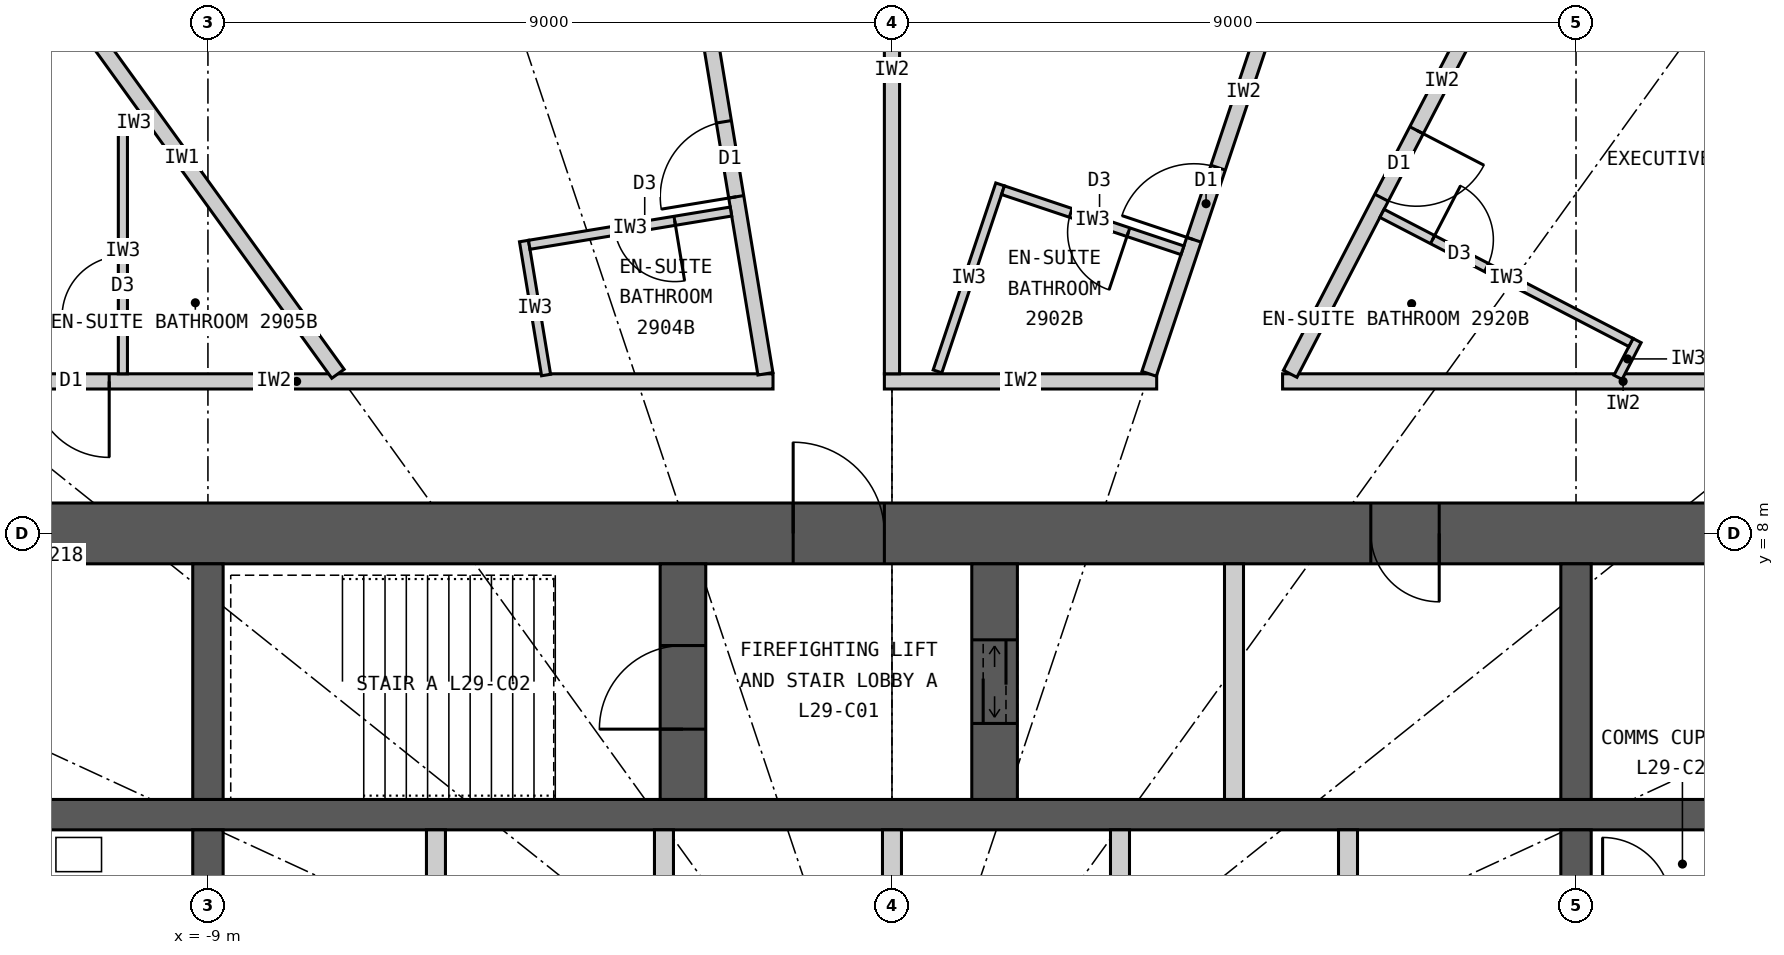
"""IFC4 building model, lengths in metres.
Left out: names, types, materials, properties, quantities, classifications, styles, units other than length and angle.
Written with IfcOpenShell. Run it as: python <this file> out.ifc"""

import sys

from ifc_helpers import new_model, si_unit, direction, frame, frame_2d, origin, place, context, subcontext, project, spatial, rectangle, extrude, element, fill, save


model = new_model("IFC4")
c1 = context("Model", 3, precision=1e-05, world=origin(), true_north=direction((0.0, 1.0)))
c2 = subcontext(c1, "Body", "Model", "MODEL_VIEW")
j1 = project(units=[si_unit("LENGTHUNIT", "METRE"), si_unit("PLANEANGLEUNIT", "RADIAN")], contexts=[c1])
p1 = place(None, origin())
s1 = spatial("IfcSite", under=j1, at=p1, CompositionType="ELEMENT")
p2 = place(p1, origin())
s2 = spatial("IfcBuilding", under=s1, at=p2, CompositionType="ELEMENT")
p3 = place(p2, frame((0.0, 0.0, 115.5)))
s3 = spatial("IfcBuildingStorey", under=s2, at=p3, CompositionType="ELEMENT", Elevation=115.5)
p4 = place(p3, frame((-12.4, 8.0, 0.0), z_axis=(0.0, 0.0, 1.0), x_axis=(1.0, 0.0, 0.0)))
e1 = element("IfcWall", 1, at=p4, inside=s3, PredefinedType="SHEAR", context=c2, shape_type="SweptSolid", body=[
    extrude(rectangle(XDim=24.8, YDim=0.8, at=frame_2d((12.4, 0.0))), origin(), (0.0, 0.0, 1.0), 3.3),
])
p5 = place(p4, frame((11.1, 0.0, 0.0)))
e2 = element("IfcOpeningElement", 2, at=p5, cuts=e1, PredefinedType="OPENING", context=c2, shape_type="SweptSolid", body=[
    extrude(rectangle(XDim=1.2, YDim=2.2, at=frame_2d((0.6, 1.1))), frame((0.0, 0.41, 0.0), z_axis=(0.0, -1.0, 0.0), x_axis=(1.0, 0.0, 0.0)), (0.0, 0.0, 1.0), 0.82),
])
p6 = place(p4, frame((18.7, 0.0, 0.0)))
e3 = element("IfcOpeningElement", 3, at=p6, cuts=e1, PredefinedType="OPENING", context=c2, shape_type="SweptSolid", body=[
    extrude(rectangle(XDim=0.9, YDim=2.2, at=frame_2d((0.45, 1.1))), frame((0.0, 0.41, 0.0), z_axis=(0.0, -1.0, 0.0), x_axis=(1.0, 0.0, 0.0)), (0.0, 0.0, 1.0), 0.82),
])
p7 = place(p3, frame((-11.6, 4.3, 0.0), z_axis=(0.0, 0.0, 1.0), x_axis=(1.0, 0.0, 0.0)))
e4 = element("IfcWall", 4, at=p7, inside=s3, PredefinedType="SHEAR", context=c2, shape_type="SweptSolid", body=[
    extrude(rectangle(XDim=23.2, YDim=0.4, at=frame_2d((11.6, 0.0))), origin(), (0.0, 0.0, 1.0), 3.3),
])
p8 = place(p3, frame((-9.0, 4.5, 0.0), z_axis=(0.0, 0.0, 1.0), x_axis=(0.0, 1.0, 0.0)))
e5 = element("IfcWall", 5, at=p8, inside=s3, PredefinedType="SHEAR", context=c2, shape_type="SweptSolid", body=[
    extrude(rectangle(XDim=3.1, YDim=0.4, at=frame_2d((1.55, 0.0))), origin(), (0.0, 0.0, 1.0), 3.3),
])
p9 = place(p3, frame((-9.0, 1.75, 0.0), z_axis=(0.0, 0.0, 1.0), x_axis=(0.0, 1.0, 0.0)))
e6 = element("IfcWall", 6, at=p9, inside=s3, PredefinedType="SHEAR", context=c2, shape_type="SweptSolid", body=[
    extrude(rectangle(XDim=2.35, YDim=0.4, at=frame_2d((1.175, 0.0))), origin(), (0.0, 0.0, 1.0), 3.3),
])
p10 = place(p3, frame((9.0, 4.5, 0.0), z_axis=(0.0, 0.0, 1.0), x_axis=(0.0, 1.0, 0.0)))
e7 = element("IfcWall", 7, at=p10, inside=s3, PredefinedType="SHEAR", context=c2, shape_type="SweptSolid", body=[
    extrude(rectangle(XDim=3.1, YDim=0.4, at=frame_2d((1.55, 0.0))), origin(), (0.0, 0.0, 1.0), 3.3),
])
p11 = place(p3, frame((9.0, 1.75, 0.0), z_axis=(0.0, 0.0, 1.0), x_axis=(0.0, 1.0, 0.0)))
e8 = element("IfcWall", 8, at=p11, inside=s3, PredefinedType="SHEAR", context=c2, shape_type="SweptSolid", body=[
    extrude(rectangle(XDim=2.35, YDim=0.4, at=frame_2d((1.175, 0.0))), origin(), (0.0, 0.0, 1.0), 3.3),
])
p12 = place(p3, frame((-2.75, 4.5, 0.0), z_axis=(0.0, 0.0, 1.0), x_axis=(0.0, 1.0, 0.0)))
e9 = element("IfcWall", 9, at=p12, inside=s3, PredefinedType="SHEAR", context=c2, shape_type="SweptSolid", body=[
    extrude(rectangle(XDim=3.1, YDim=0.6, at=frame_2d((1.55, 0.0))), origin(), (0.0, 0.0, 1.0), 3.3),
])
p13 = place(p12, frame((0.925, 0.0, 0.0)))
e10 = element("IfcOpeningElement", 10, at=p13, cuts=e9, PredefinedType="OPENING", context=c2, shape_type="SweptSolid", body=[
    extrude(rectangle(XDim=1.1, YDim=2.2, at=frame_2d((0.55, 1.1))), frame((0.0, 0.31, 0.0), z_axis=(0.0, -1.0, 0.0), x_axis=(1.0, 0.0, 0.0)), (0.0, 0.0, 1.0), 0.62),
])
p14 = place(p3, frame((1.35, 4.5, 0.0), z_axis=(0.0, 0.0, 1.0), x_axis=(0.0, 1.0, 0.0)))
e11 = element("IfcWall", 11, at=p14, inside=s3, PredefinedType="SHEAR", context=c2, shape_type="SweptSolid", body=[
    extrude(rectangle(XDim=3.1, YDim=0.6, at=frame_2d((1.55, 0.0))), origin(), (0.0, 0.0, 1.0), 3.3),
])
p15 = place(p14, frame((1.0, 0.0, 0.0)))
e12 = element("IfcOpeningElement", 12, at=p15, cuts=e11, PredefinedType="OPENING", context=c2, shape_type="SweptSolid", body=[
    extrude(rectangle(XDim=1.1, YDim=2.2, at=frame_2d((0.55, 1.1))), frame((0.0, 0.31, 0.0), z_axis=(0.0, -1.0, 0.0), x_axis=(1.0, 0.0, 0.0)), (0.0, 0.0, 1.0), 0.62),
])
p16 = place(p3, frame((4.5, 4.5, 0.0), z_axis=(0.0, 0.0, 1.0), x_axis=(0.0, 1.0, 0.0)))
e13 = element("IfcWall", 13, at=p16, inside=s3, PredefinedType="PARTITIONING", context=c2, shape_type="SweptSolid", body=[
    extrude(rectangle(XDim=3.1, YDim=0.25, at=frame_2d((1.55, 0.0))), origin(), (0.0, 0.0, 1.0), 3.3),
])
for number, where, z_axis, x_axis in (
    (14, (-6.0, 1.75, 0.0), (0.0, 0.0, 1.0), (0.0, 1.0, 0.0)),
    (15, (-3.0, 1.75, 0.0), (0.0, 0.0, 1.0), (0.0, 1.0, 0.0)),
    (16, (0.0, 1.75, 0.0), (0.0, 0.0, 1.0), (0.0, 1.0, 0.0)),
    (17, (3.0, 1.75, 0.0), (0.0, 0.0, 1.0), (0.0, 1.0, 0.0)),
    (18, (6.0, 1.75, 0.0), (0.0, 0.0, 1.0), (0.0, 1.0, 0.0)),
):
    element("IfcWall", number, at=place(p3, frame(where, z_axis=z_axis, x_axis=x_axis)), inside=s3, PredefinedType="PARTITIONING", context=c2, shape_type="SweptSolid", body=[
        extrude(rectangle(XDim=2.35, YDim=0.25, at=frame_2d((1.175, 0.0))), origin(), (0.0, 0.0, 1.0), 3.3),
    ])
p17 = place(p3, frame((-14.1, 10.0, 0.0), z_axis=(0.0, 0.0, 1.0), x_axis=(1.0, 0.0, 0.0)))
e19 = element("IfcWall", 19, at=p17, inside=s3, PredefinedType="PARTITIONING", context=c2, shape_type="SweptSolid", body=[
    extrude(rectangle(XDim=12.535, YDim=0.2, at=frame_2d((6.268, 0.0))), origin(), (0.0, 0.0, 1.0), 3.12),
])
p18 = place(p17, frame((2.801, 0.0, 0.0)))
e20 = element("IfcOpeningElement", 20, at=p18, cuts=e19, PredefinedType="OPENING", context=c2, shape_type="SweptSolid", body=[
    extrude(rectangle(XDim=1.0, YDim=2.2, at=frame_2d((0.5, 1.1))), frame((0.0, 0.11, 0.0), z_axis=(0.0, -1.0, 0.0), x_axis=(1.0, 0.0, 0.0)), (0.0, 0.0, 1.0), 0.22),
])
p19 = place(p3, frame((-0.1, 10.0, 0.0), z_axis=(0.0, 0.0, 1.0), x_axis=(1.0, 0.0, 0.0)))
e21 = element("IfcWall", 21, at=p19, inside=s3, PredefinedType="PARTITIONING", context=c2, shape_type="SweptSolid", body=[
    extrude(rectangle(XDim=3.583, YDim=0.2, at=frame_2d((1.792, 0.0))), origin(), (0.0, 0.0, 1.0), 3.12),
])
p20 = place(p3, frame((5.139, 10.0, 0.0), z_axis=(0.0, 0.0, 1.0), x_axis=(1.0, 0.0, 0.0)))
e22 = element("IfcWall", 22, at=p20, inside=s3, PredefinedType="PARTITIONING", context=c2, shape_type="SweptSolid", body=[
    extrude(rectangle(XDim=8.961, YDim=0.2, at=frame_2d((4.48, 0.0))), origin(), (0.0, 0.0, 1.0), 3.12),
])
p21 = place(p3, frame((5.239, 10.1, 0.0), z_axis=(0.0, 0.0, 1.0), x_axis=(0.4604797896, 0.887670188398, 0.0)))
e23 = element("IfcWall", 23, at=p21, inside=s3, PredefinedType="PARTITIONING", context=c2, shape_type="SweptSolid", body=[
    extrude(rectangle(XDim=8.676, YDim=0.2, at=frame_2d((4.338, 0.0))), origin(), (0.0, 0.0, 1.0), 3.12),
])
p22 = place(p21, frame((2.61, 0.0, 0.0)))
e24 = element("IfcOpeningElement", 24, at=p22, cuts=e23, PredefinedType="OPENING", context=c2, shape_type="SweptSolid", body=[
    extrude(rectangle(XDim=1.0, YDim=2.2, at=frame_2d((0.5, 1.1))), frame((0.0, 0.11, 0.0), z_axis=(0.0, -1.0, 0.0), x_axis=(1.0, 0.0, 0.0)), (0.0, 0.0, 1.0), 0.22),
])
p23 = place(p3, frame((3.383, 10.1, 0.0), z_axis=(0.0, 0.0, 1.0), x_axis=(0.317603705574, 0.948223542318, 0.0)))
e25 = element("IfcWall", 25, at=p23, inside=s3, PredefinedType="PARTITIONING", context=c2, shape_type="SweptSolid", body=[
    extrude(rectangle(XDim=7.823, YDim=0.2, at=frame_2d((3.912, 0.0))), origin(), (0.0, 0.0, 1.0), 2.37),
])
p24 = place(p23, frame((1.86, 0.0, 0.0)))
e26 = element("IfcOpeningElement", 26, at=p24, cuts=e25, PredefinedType="OPENING", context=c2, shape_type="SweptSolid", body=[
    extrude(rectangle(XDim=1.0, YDim=2.2, at=frame_2d((0.5, 1.1))), frame((0.0, 0.11, 0.0), z_axis=(0.0, -1.0, 0.0), x_axis=(1.0, 0.0, 0.0)), (0.0, 0.0, 1.0), 0.22),
])
p25 = place(p3, frame((0.0, 10.1, 0.0), z_axis=(0.0, 0.0, 1.0), x_axis=(0.0, 1.0, 0.0)))
e27 = element("IfcWall", 27, at=p25, inside=s3, PredefinedType="PARTITIONING", context=c2, shape_type="SweptSolid", body=[
    extrude(rectangle(XDim=8.0, YDim=0.2, at=frame_2d((4.0, 0.0))), origin(), (0.0, 0.0, 1.0), 2.37),
])
p26 = place(p3, frame((-1.665, 10.1, 0.0), z_axis=(0.0, 0.0, 1.0), x_axis=(-0.162660519103, 0.986682094459, 0.0)))
e28 = element("IfcWall", 28, at=p26, inside=s3, PredefinedType="PARTITIONING", context=c2, shape_type="SweptSolid", body=[
    extrude(rectangle(XDim=9.111, YDim=0.2, at=frame_2d((4.555, 0.0))), origin(), (0.0, 0.0, 1.0), 3.12),
])
p27 = place(p26, frame((2.36, 0.0, 0.0)))
e29 = element("IfcOpeningElement", 29, at=p27, cuts=e28, PredefinedType="OPENING", context=c2, shape_type="SweptSolid", body=[
    extrude(rectangle(XDim=1.0, YDim=2.2, at=frame_2d((0.5, 1.1))), frame((0.0, 0.11, 0.0), z_axis=(0.0, -1.0, 0.0), x_axis=(1.0, 0.0, 0.0)), (0.0, 0.0, 1.0), 0.22),
])
p28 = place(p3, frame((-7.289, 10.1, 0.0), z_axis=(0.0, 0.0, 1.0), x_axis=(-0.585217367024, 0.81087645997, 0.0)))
e30 = element("IfcWall", 30, at=p28, inside=s3, PredefinedType="PARTITIONING", context=c2, shape_type="SweptSolid", body=[
    extrude(rectangle(XDim=7.016, YDim=0.2, at=frame_2d((3.508, 0.0))), origin(), (0.0, 0.0, 1.0), 2.37),
])
p29 = place(p3, frame((0.599, 10.132, 0.0), z_axis=(0.0, 0.0, 1.0), x_axis=(0.317554522053, 0.948240014724, 0.0)))
e31 = element("IfcWall", 31, at=p29, inside=s3, PredefinedType="PARTITIONING", context=c2, shape_type="SweptSolid", body=[
    extrude(rectangle(XDim=2.594, YDim=0.12, at=frame_2d((1.297, 0.0))), origin(), (0.0, 0.0, 1.0), 3.12),
])
p30 = place(p3, frame((3.822, 11.725, 0.0), z_axis=(0.0, 0.0, 1.0), x_axis=(-0.948231307998, 0.317580519761, 0.0)))
e32 = element("IfcWall", 32, at=p30, inside=s3, PredefinedType="PARTITIONING", context=c2, shape_type="SweptSolid", body=[
    extrude(rectangle(XDim=2.49, YDim=0.12, at=frame_2d((1.245, 0.0))), origin(), (0.0, 0.0, 1.0), 3.12),
])
p31 = place(p30, frame((0.75, 0.0, 0.0)))
e33 = element("IfcOpeningElement", 33, at=p31, cuts=e32, PredefinedType="OPENING", context=c2, shape_type="SweptSolid", body=[
    extrude(rectangle(XDim=0.8, YDim=2.1, at=frame_2d((0.4, 1.05))), frame((0.0, 0.07, 0.0), z_axis=(0.0, -1.0, 0.0), x_axis=(1.0, 0.0, 0.0)), (0.0, 0.0, 1.0), 0.14),
])
p32 = place(p3, frame((-4.551, 10.084, 0.0), z_axis=(0.0, 0.0, 1.0), x_axis=(-0.162625830583, 0.986687812445, 0.0)))
e34 = element("IfcWall", 34, at=p32, inside=s3, PredefinedType="PARTITIONING", context=c2, shape_type="SweptSolid", body=[
    extrude(rectangle(XDim=1.786, YDim=0.12, at=frame_2d((0.893, 0.0))), origin(), (0.0, 0.0, 1.0), 3.12),
])
p33 = place(p3, frame((-2.118, 12.235, 0.0), z_axis=(0.0, 0.0, 1.0), x_axis=(-0.986686682911, -0.16263268357, 0.0)))
e35 = element("IfcWall", 35, at=p33, inside=s3, PredefinedType="PARTITIONING", context=c2, shape_type="SweptSolid", body=[
    extrude(rectangle(XDim=2.69, YDim=0.12, at=frame_2d((1.345, 0.0))), origin(), (0.0, 0.0, 1.0), 3.12),
])
p34 = place(p33, frame((0.75, 0.0, 0.0)))
e36 = element("IfcOpeningElement", 36, at=p34, cuts=e35, PredefinedType="OPENING", context=c2, shape_type="SweptSolid", body=[
    extrude(rectangle(XDim=0.8, YDim=2.1, at=frame_2d((0.4, 1.05))), frame((0.0, 0.07, 0.0), z_axis=(0.0, -1.0, 0.0), x_axis=(1.0, 0.0, 0.0)), (0.0, 0.0, 1.0), 0.14),
])
p35 = place(p3, frame((-9.771, 13.4, 0.0), z_axis=(0.0, 0.0, 1.0), x_axis=(-1.0, 0.0, 0.0)))
e37 = element("IfcWall", 37, at=p35, inside=s3, PredefinedType="PARTITIONING", context=c2, shape_type="SweptSolid", body=[
    extrude(rectangle(XDim=0.408, YDim=0.12, at=frame_2d((0.204, 0.0))), origin(), (0.0, 0.0, 1.0), 3.12),
])
p36 = place(p3, frame((-10.119, 10.1, 0.0), z_axis=(0.0, 0.0, 1.0), x_axis=(0.0, 1.0, 0.0)))
e38 = element("IfcWall", 38, at=p36, inside=s3, PredefinedType="PARTITIONING", context=c2, shape_type="SweptSolid", body=[
    extrude(rectangle(XDim=3.24, YDim=0.12, at=frame_2d((1.62, 0.0))), origin(), (0.0, 0.0, 1.0), 3.12),
])
p37 = place(p36, frame((0.75, 0.0, 0.0)))
e39 = element("IfcOpeningElement", 39, at=p37, cuts=e38, PredefinedType="OPENING", context=c2, shape_type="SweptSolid", body=[
    extrude(rectangle(XDim=0.8, YDim=2.1, at=frame_2d((0.4, 1.05))), frame((0.0, 0.07, 0.0), z_axis=(0.0, -1.0, 0.0), x_axis=(1.0, 0.0, 0.0)), (0.0, 0.0, 1.0), 0.14),
])
p38 = place(p3, frame((9.552, 10.054, 0.0), z_axis=(0.0, 0.0, 1.0), x_axis=(0.460604866949, 0.887605293215, 0.0)))
e40 = element("IfcWall", 40, at=p38, inside=s3, PredefinedType="PARTITIONING", context=c2, shape_type="SweptSolid", body=[
    extrude(rectangle(XDim=0.545, YDim=0.12, at=frame_2d((0.272, 0.0))), origin(), (0.0, 0.0, 1.0), 3.12),
])
p39 = place(p3, frame((6.447, 12.211, 0.0), z_axis=(0.0, 0.0, 1.0), x_axis=(0.887685422499, -0.460450421525, 0.0)))
e41 = element("IfcWall", 41, at=p39, inside=s3, PredefinedType="PARTITIONING", context=c2, shape_type="SweptSolid", body=[
    extrude(rectangle(XDim=3.69, YDim=0.12, at=frame_2d((1.845, 0.0))), origin(), (0.0, 0.0, 1.0), 3.12),
])
p40 = place(p39, frame((0.75, 0.0, 0.0)))
e42 = element("IfcOpeningElement", 42, at=p40, cuts=e41, PredefinedType="OPENING", context=c2, shape_type="SweptSolid", body=[
    extrude(rectangle(XDim=0.8, YDim=2.1, at=frame_2d((0.4, 1.05))), frame((0.0, 0.07, 0.0), z_axis=(0.0, -1.0, 0.0), x_axis=(1.0, 0.0, 0.0)), (0.0, 0.0, 1.0), 0.14),
])
p41 = place(p31, origin())
e43 = element("IfcDoor", 43, at=p41, inside=s3, OperationType="SINGLE_SWING_LEFT", PredefinedType="DOOR", context=c2, shape_type="SweptSolid", body=[
    extrude(rectangle(XDim=0.8, YDim=2.1, at=frame_2d((0.4, 1.05))), frame((0.0, 0.025, 0.0), z_axis=(0.0, -1.0, 0.0), x_axis=(1.0, 0.0, 0.0)), (0.0, 0.0, 1.0), 0.05),
])
fill(e33, e43)
p42 = place(p24, origin())
e44 = element("IfcDoor", 44, at=p42, inside=s3, OperationType="SINGLE_SWING_LEFT", PredefinedType="DOOR", context=c2, shape_type="SweptSolid", body=[
    extrude(rectangle(XDim=1.0, YDim=2.2, at=frame_2d((0.5, 1.1))), frame((0.0, 0.025, 0.0), z_axis=(0.0, -1.0, 0.0), x_axis=(1.0, 0.0, 0.0)), (0.0, 0.0, 1.0), 0.05),
])
fill(e26, e44)
p43 = place(p34, origin())
e45 = element("IfcDoor", 45, at=p43, inside=s3, OperationType="SINGLE_SWING_LEFT", PredefinedType="DOOR", context=c2, shape_type="SweptSolid", body=[
    extrude(rectangle(XDim=0.8, YDim=2.1, at=frame_2d((0.4, 1.05))), frame((0.0, 0.025, 0.0), z_axis=(0.0, -1.0, 0.0), x_axis=(1.0, 0.0, 0.0)), (0.0, 0.0, 1.0), 0.05),
])
fill(e36, e45)
p44 = place(p27, origin())
e46 = element("IfcDoor", 46, at=p44, inside=s3, OperationType="SINGLE_SWING_LEFT", PredefinedType="DOOR", context=c2, shape_type="SweptSolid", body=[
    extrude(rectangle(XDim=1.0, YDim=2.2, at=frame_2d((0.5, 1.1))), frame((0.0, 0.025, 0.0), z_axis=(0.0, -1.0, 0.0), x_axis=(1.0, 0.0, 0.0)), (0.0, 0.0, 1.0), 0.05),
])
fill(e29, e46)
p45 = place(p37, origin())
e47 = element("IfcDoor", 47, at=p45, inside=s3, OperationType="SINGLE_SWING_LEFT", PredefinedType="DOOR", context=c2, shape_type="SweptSolid", body=[
    extrude(rectangle(XDim=0.8, YDim=2.1, at=frame_2d((0.4, 1.05))), frame((0.0, 0.025, 0.0), z_axis=(0.0, -1.0, 0.0), x_axis=(1.0, 0.0, 0.0)), (0.0, 0.0, 1.0), 0.05),
])
fill(e39, e47)
p46 = place(p18, origin())
e48 = element("IfcDoor", 48, at=p46, inside=s3, OperationType="SINGLE_SWING_RIGHT", PredefinedType="DOOR", context=c2, shape_type="SweptSolid", body=[
    extrude(rectangle(XDim=1.0, YDim=2.2, at=frame_2d((0.5, 1.1))), frame((0.0, 0.025, 0.0), z_axis=(0.0, -1.0, 0.0), x_axis=(1.0, 0.0, 0.0)), (0.0, 0.0, 1.0), 0.05),
])
fill(e20, e48)
p47 = place(p40, origin())
e49 = element("IfcDoor", 49, at=p47, inside=s3, OperationType="SINGLE_SWING_LEFT", PredefinedType="DOOR", context=c2, shape_type="SweptSolid", body=[
    extrude(rectangle(XDim=0.8, YDim=2.1, at=frame_2d((0.4, 1.05))), frame((0.0, 0.025, 0.0), z_axis=(0.0, -1.0, 0.0), x_axis=(1.0, 0.0, 0.0)), (0.0, 0.0, 1.0), 0.05),
])
fill(e42, e49)
p48 = place(p22, origin())
e50 = element("IfcDoor", 50, at=p48, inside=s3, OperationType="SINGLE_SWING_RIGHT", PredefinedType="DOOR", context=c2, shape_type="SweptSolid", body=[
    extrude(rectangle(XDim=1.0, YDim=2.2, at=frame_2d((0.5, 1.1))), frame((0.0, 0.025, 0.0), z_axis=(0.0, -1.0, 0.0), x_axis=(1.0, 0.0, 0.0)), (0.0, 0.0, 1.0), 0.05),
])
fill(e24, e50)
p49 = place(p5, origin())
e51 = element("IfcDoor", 51, at=p49, inside=s3, OperationType="SINGLE_SWING_LEFT", PredefinedType="DOOR", context=c2, shape_type="SweptSolid", body=[
    extrude(rectangle(XDim=1.2, YDim=2.2, at=frame_2d((0.6, 1.1))), frame((0.0, 0.025, 0.0), z_axis=(0.0, -1.0, 0.0), x_axis=(1.0, 0.0, 0.0)), (0.0, 0.0, 1.0), 0.05),
])
fill(e2, e51)
p50 = place(p13, origin())
e52 = element("IfcDoor", 52, at=p50, inside=s3, OperationType="SINGLE_SWING_LEFT", PredefinedType="DOOR", context=c2, shape_type="SweptSolid", body=[
    extrude(rectangle(XDim=1.1, YDim=2.2, at=frame_2d((0.55, 1.1))), frame((0.0, 0.025, 0.0), z_axis=(0.0, -1.0, 0.0), x_axis=(1.0, 0.0, 0.0)), (0.0, 0.0, 1.0), 0.05),
])
fill(e10, e52)
p51 = place(p15, origin())
e53 = element("IfcDoor", 53, at=p51, inside=s3, OperationType="DOUBLE_DOOR_SLIDING", PredefinedType="DOOR", context=c2, shape_type="SweptSolid", body=[
    extrude(rectangle(XDim=1.1, YDim=2.2, at=frame_2d((0.55, 1.1))), frame((0.0, 0.025, 0.0), z_axis=(0.0, -1.0, 0.0), x_axis=(1.0, 0.0, 0.0)), (0.0, 0.0, 1.0), 0.05),
])
fill(e12, e53)
p52 = place(p6, origin())
e54 = element("IfcDoor", 54, at=p52, inside=s3, OperationType="SINGLE_SWING_RIGHT", PredefinedType="DOOR", context=c2, shape_type="SweptSolid", body=[
    extrude(rectangle(XDim=0.9, YDim=2.2, at=frame_2d((0.45, 1.1))), frame((0.0, 0.025, 0.0), z_axis=(0.0, -1.0, 0.0), x_axis=(1.0, 0.0, 0.0)), (0.0, 0.0, 1.0), 0.05),
])
fill(e3, e54)
save(model, sys.argv[1])
